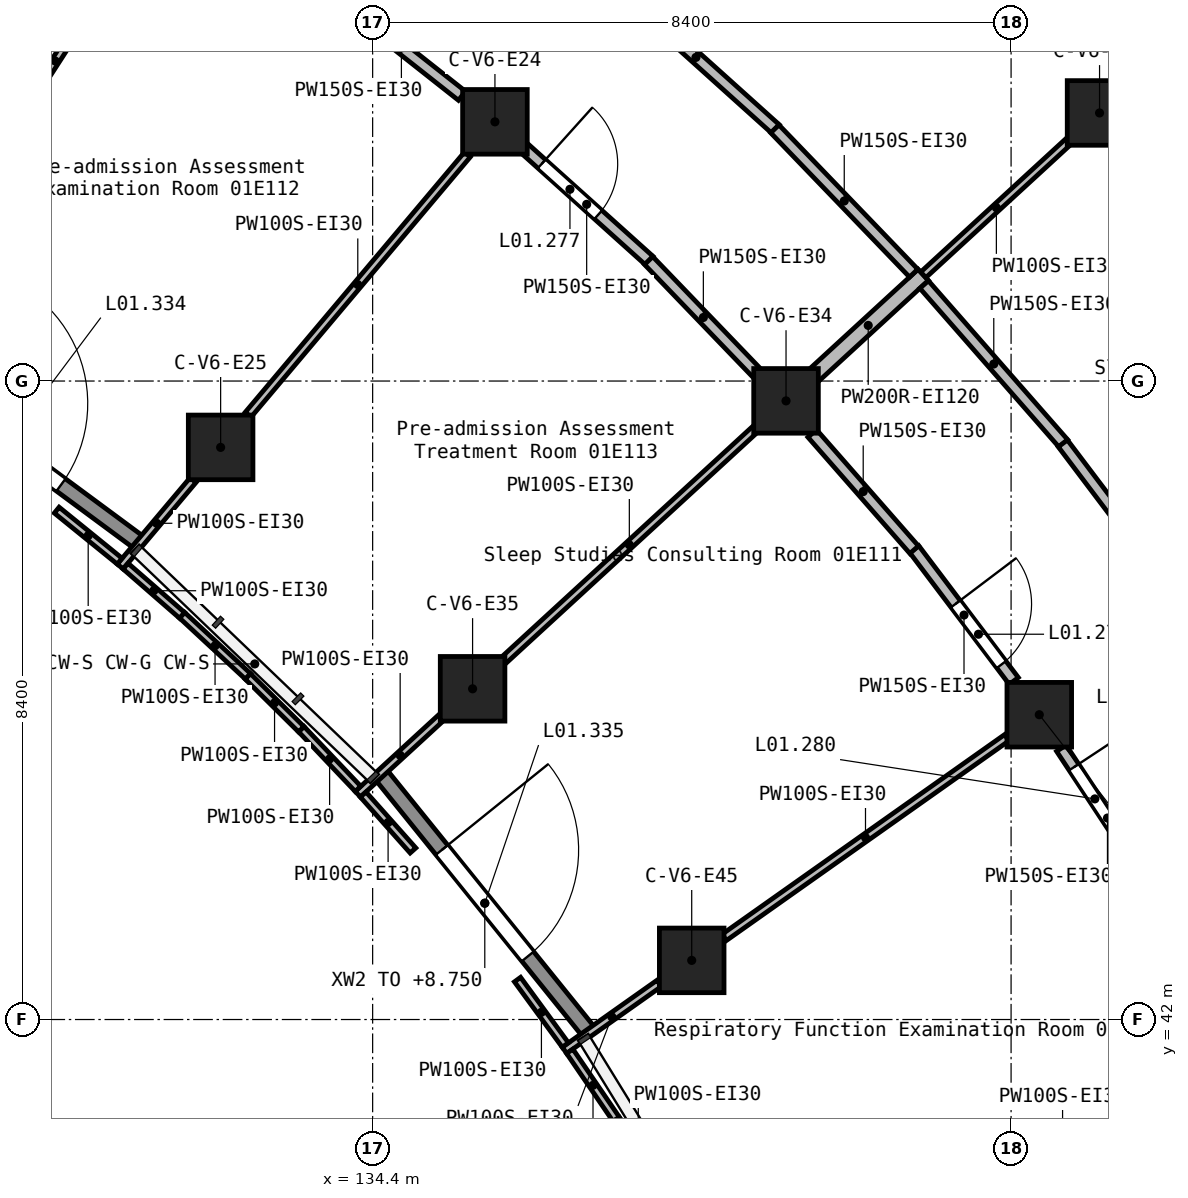
"""IFC4 building model, lengths in metres.
Left out: names, types, materials, properties, quantities, classifications, styles, units other than length and angle.
Written with IfcOpenShell. Run it as: python <this file> out.ifc"""

import sys

from ifc_helpers import new_model, si_unit, direction, frame, frame_2d, origin, origin_2d, place, context, subcontext, project, spatial, rectangle, extrude, element, fill, save


model = new_model("IFC4")
c1 = context("Model", 3, precision=1e-05, world=origin(), true_north=direction((0.0, 1.0)))
c2 = subcontext(c1, "Body", "Model", "MODEL_VIEW")
j1 = project(units=[si_unit("LENGTHUNIT", "METRE"), si_unit("PLANEANGLEUNIT", "RADIAN")], contexts=[c1])
p1 = place(None, origin())
s1 = spatial("IfcSite", under=j1, at=p1, CompositionType="ELEMENT")
p2 = place(p1, origin())
s2 = spatial("IfcBuilding", under=s1, at=p2, CompositionType="ELEMENT")
p3 = place(p2, frame((0.0, 0.0, 5.4)))
s3 = spatial("IfcBuildingStorey", under=s2, at=p3, CompositionType="ELEMENT", Elevation=5.4)
for number, where, z_axis, x_axis in (
    (1, (132.4, 49.527, 0.0), (0.0, 0.0, 1.0), (1.0, 0.0, 0.0)),
    (2, (135.715, 46.351, 0.0), (0.0, 0.0, 1.0), (1.0, 0.0, 0.0)),
    (3, (136.009, 53.81, 0.0), (0.0, 0.0, 1.0), (1.0, 0.0, 0.0)),
    (4, (138.598, 42.778, 0.0), (0.0, 0.0, 1.0), (1.0, 0.0, 0.0)),
    (5, (139.839, 50.139, 0.0), (0.0, 0.0, 1.0), (1.0, 0.0, 0.0)),
    (6, (143.171, 46.01, 0.0), (0.0, 0.0, 1.0), (1.0, 0.0, 0.0)),
    (7, (143.964, 53.927, 0.0), (0.0, 0.0, 1.0), (1.0, 0.0, 0.0)),
):
    element("IfcColumn", number, at=place(p3, frame(where, z_axis=z_axis, x_axis=x_axis)), inside=s3, PredefinedType="COLUMN", context=c2, shape_type="SweptSolid", body=[
        extrude(rectangle(XDim=0.85, YDim=0.85, at=origin_2d()), origin(), (0.0, 0.0, 1.0), 4.5),
    ])
p4 = place(p3, frame((127.819, 50.866, 0.0), z_axis=(0.0, 0.0, 1.0), x_axis=(0.804238862444, -0.594306193923, 0.0)))
e8 = element("IfcWall", 8, at=p4, inside=s3, PredefinedType="STANDARD", context=c2, shape_type="SweptSolid", body=[
    extrude(rectangle(XDim=4.368, YDim=0.2, at=frame_2d((2.184, 0.0))), origin(), (0.0, 0.0, 1.0), 3.35),
])
p5 = place(p4, frame((1.284, 0.0, 0.0)))
e9 = element("IfcOpeningElement", 9, at=p5, cuts=e8, PredefinedType="OPENING", context=c2, shape_type="SweptSolid", body=[
    extrude(rectangle(XDim=1.8, YDim=2.4, at=frame_2d((0.9, 1.2))), frame((0.0, 0.11, 0.0), z_axis=(0.0, -1.0, 0.0), x_axis=(1.0, 0.0, 0.0)), (0.0, 0.0, 1.0), 0.22),
])
p6 = place(p3, frame((134.504, 45.23, 0.0), z_axis=(0.0, 0.0, 1.0), x_axis=(0.628043022297, -0.778178618406, 0.0)))
e10 = element("IfcWall", 10, at=p6, inside=s3, PredefinedType="STANDARD", context=c2, shape_type="SweptSolid", body=[
    extrude(rectangle(XDim=4.368, YDim=0.2, at=frame_2d((2.184, 0.0))), origin(), (0.0, 0.0, 1.0), 3.35),
])
p7 = place(p6, frame((1.284, 0.0, 0.0)))
e11 = element("IfcOpeningElement", 11, at=p7, cuts=e10, PredefinedType="OPENING", context=c2, shape_type="SweptSolid", body=[
    extrude(rectangle(XDim=1.8, YDim=2.4, at=frame_2d((0.9, 1.2))), frame((0.0, 0.11, 0.0), z_axis=(0.0, -1.0, 0.0), x_axis=(1.0, 0.0, 0.0)), (0.0, 0.0, 1.0), 0.22),
])
p8 = place(p3, frame((140.196, 50.467, 0.0), z_axis=(0.0, 0.0, 1.0), x_axis=(0.736519787736, 0.676415997943, 0.0)))
e12 = element("IfcWall", 12, at=p8, inside=s3, PredefinedType="SOLIDWALL", context=c2, shape_type="SweptSolid", body=[
    extrude(rectangle(XDim=1.966, YDim=0.2, at=frame_2d((0.983, 0.0))), origin(), (0.0, 0.0, 1.0), 4.15),
])
p9 = place(p3, frame((141.656, 51.669, 0.0), z_axis=(0.0, 0.0, 1.0), x_axis=(0.659076402407, -0.752075990702, 0.0)))
e13 = element("IfcWall", 13, at=p9, inside=s3, PredefinedType="PARTITIONING", context=c2, shape_type="SweptSolid", body=[
    extrude(rectangle(XDim=2.78, YDim=0.15, at=frame_2d((1.39, 0.0))), origin(), (0.0, 0.0, 1.0), 4.15),
])
p10 = place(p3, frame((137.608, 55.598, 0.0), z_axis=(0.0, 0.0, 1.0), x_axis=(0.743501368773, -0.668734412628, 0.0)))
e14 = element("IfcWall", 14, at=p10, inside=s3, PredefinedType="PARTITIONING", context=c2, shape_type="SweptSolid", body=[
    extrude(rectangle(XDim=2.812, YDim=0.15, at=frame_2d((1.406, 0.0))), origin(), (0.0, 0.0, 1.0), 4.15),
])
p11 = place(p3, frame((143.481, 49.579, 0.0), z_axis=(0.0, 0.0, 1.0), x_axis=(0.602824021104, -0.797874175281, 0.0)))
e15 = element("IfcWall", 15, at=p11, inside=s3, PredefinedType="PARTITIONING", context=c2, shape_type="SweptSolid", body=[
    extrude(rectangle(XDim=2.666, YDim=0.15, at=frame_2d((1.333, 0.0))), origin(), (0.0, 0.0, 1.0), 4.15),
])
p12 = place(p3, frame((139.691, 53.718, 0.0), z_axis=(0.0, 0.0, 1.0), x_axis=(0.693447550136, -0.720507109757, 0.0)))
e16 = element("IfcWall", 16, at=p12, inside=s3, PredefinedType="PARTITIONING", context=c2, shape_type="SweptSolid", body=[
    extrude(rectangle(XDim=2.635, YDim=0.15, at=frame_2d((1.317, 0.0))), origin(), (0.0, 0.0, 1.0), 4.15),
])
p13 = place(p3, frame((136.393, 53.465, 0.0), z_axis=(0.0, 0.0, 1.0), x_axis=(0.743617683722, -0.668605070618, 0.0)))
e17 = element("IfcWall", 17, at=p13, inside=s3, PredefinedType="PARTITIONING", context=c2, shape_type="SweptSolid", body=[
    extrude(rectangle(XDim=2.213, YDim=0.15, at=frame_2d((1.106, 0.0))), origin(), (0.0, 0.0, 1.0), 4.15),
])
p14 = place(p13, frame((0.311, 0.0, 0.0)))
e18 = element("IfcOpeningElement", 18, at=p14, cuts=e17, PredefinedType="OPENING", context=c2, shape_type="SweptSolid", body=[
    extrude(rectangle(XDim=1.0, YDim=2.1, at=frame_2d((0.5, 1.05))), frame((0.0, 0.085, 0.0), z_axis=(0.0, -1.0, 0.0), x_axis=(1.0, 0.0, 0.0)), (0.0, 0.0, 1.0), 0.17),
])
p15 = place(p3, frame((141.526, 48.188, 0.0), z_axis=(0.0, 0.0, 1.0), x_axis=(0.60280129331, -0.797891346477, 0.0)))
e19 = element("IfcWall", 19, at=p15, inside=s3, PredefinedType="PARTITIONING", context=c2, shape_type="SweptSolid", body=[
    extrude(rectangle(XDim=2.172, YDim=0.15, at=frame_2d((1.086, 0.0))), origin(), (0.0, 0.0, 1.0), 4.15),
])
p16 = place(p15, frame((0.902, 0.0, 0.0)))
e20 = element("IfcOpeningElement", 20, at=p16, cuts=e19, PredefinedType="OPENING", context=c2, shape_type="SweptSolid", body=[
    extrude(rectangle(XDim=1.0, YDim=2.1, at=frame_2d((0.5, 1.05))), frame((0.0, 0.085, 0.0), z_axis=(0.0, -1.0, 0.0), x_axis=(1.0, 0.0, 0.0)), (0.0, 0.0, 1.0), 0.17),
])
p17 = place(p3, frame((143.462, 45.57, 0.0), z_axis=(0.0, 0.0, 1.0), x_axis=(0.550880835548, -0.834583911315, 0.0)))
e21 = element("IfcWall", 21, at=p17, inside=s3, PredefinedType="PARTITIONING", context=c2, shape_type="SweptSolid", body=[
    extrude(rectangle(XDim=2.201, YDim=0.15, at=frame_2d((1.101, 0.0))), origin(), (0.0, 0.0, 1.0), 4.15),
])
p18 = place(p17, frame((0.299, 0.0, 0.0)))
e22 = element("IfcOpeningElement", 22, at=p18, cuts=e21, PredefinedType="OPENING", context=c2, shape_type="SweptSolid", body=[
    extrude(rectangle(XDim=1.0, YDim=2.1, at=frame_2d((0.5, 1.05))), frame((0.0, 0.085, 0.0), z_axis=(0.0, -1.0, 0.0), x_axis=(1.0, 0.0, 0.0)), (0.0, 0.0, 1.0), 0.17),
])
p19 = place(p3, frame((133.981, 55.41, 0.0), z_axis=(0.0, 0.0, 1.0), x_axis=(0.784968928218, -0.619535133574, 0.0)))
e23 = element("IfcWall", 23, at=p19, inside=s3, PredefinedType="PARTITIONING", context=c2, shape_type="SweptSolid", body=[
    extrude(rectangle(XDim=2.031, YDim=0.15, at=frame_2d((1.015, 0.0))), origin(), (0.0, 0.0, 1.0), 4.15),
])
p20 = place(p3, frame((140.184, 49.71, 0.0), z_axis=(0.0, 0.0, 1.0), x_axis=(0.659209376091, -0.751959439381, 0.0)))
e24 = element("IfcWall", 24, at=p20, inside=s3, PredefinedType="PARTITIONING", context=c2, shape_type="SweptSolid", body=[
    extrude(rectangle(XDim=2.035, YDim=0.15, at=frame_2d((1.017, 0.0))), origin(), (0.0, 0.0, 1.0), 4.15),
])
p21 = place(p3, frame((138.031, 51.985, 0.0), z_axis=(0.0, 0.0, 1.0), x_axis=(0.693216793474, -0.7207291289, 0.0)))
e25 = element("IfcWall", 25, at=p21, inside=s3, PredefinedType="PARTITIONING", context=c2, shape_type="SweptSolid", body=[
    extrude(rectangle(XDim=2.076, YDim=0.15, at=frame_2d((1.038, 0.0))), origin(), (0.0, 0.0, 1.0), 4.15),
])
p22 = place(p3, frame((131.079, 47.96, 0.0), z_axis=(0.0, 0.0, 1.0), x_axis=(0.644403525256, 0.764685619479, 0.0)))
e26 = element("IfcWall", 26, at=p22, inside=s3, PredefinedType="PARTITIONING", context=c2, shape_type="SweptSolid", body=[
    extrude(rectangle(XDim=1.488, YDim=0.1, at=frame_2d((0.744, 0.0))), origin(), (0.0, 0.0, 1.0), 4.15),
])
p23 = place(p3, frame((132.762, 49.958, 0.0), z_axis=(0.0, 0.0, 1.0), x_axis=(0.644429680937, 0.76466357722, 0.0)))
e27 = element("IfcWall", 27, at=p23, inside=s3, PredefinedType="PARTITIONING", context=c2, shape_type="SweptSolid", body=[
    extrude(rectangle(XDim=4.475, YDim=0.1, at=frame_2d((2.238, 0.0))), origin(), (0.0, 0.0, 1.0), 4.15),
])
p24 = place(p3, frame((128.983, 52.683, 0.0), z_axis=(0.0, 0.0, 1.0), x_axis=(0.541806664818, 0.840503145716, 0.0)))
e28 = element("IfcWall", 28, at=p24, inside=s3, PredefinedType="PARTITIONING", context=c2, shape_type="SweptSolid", body=[
    extrude(rectangle(XDim=4.585, YDim=0.1, at=frame_2d((2.293, 0.0))), origin(), (0.0, 0.0, 1.0), 4.15),
])
p25 = place(p3, frame((141.427, 39.093, 0.0), z_axis=(0.0, 0.0, 1.0), x_axis=(0.88344099274, 0.46854243388, 0.0)))
e29 = element("IfcWall", 29, at=p25, inside=s3, PredefinedType="PARTITIONING", context=c2, shape_type="SweptSolid", body=[
    extrude(rectangle(XDim=4.642, YDim=0.1, at=frame_2d((2.321, 0.0))), origin(), (0.0, 0.0, 1.0), 4.15),
])
p26 = place(p3, frame((136.924, 41.595, 0.0), z_axis=(0.0, 0.0, 1.0), x_axis=(0.816643847366, 0.577141946629, 0.0)))
e30 = element("IfcWall", 30, at=p26, inside=s3, PredefinedType="PARTITIONING", context=c2, shape_type="SweptSolid", body=[
    extrude(rectangle(XDim=1.525, YDim=0.1, at=frame_2d((0.762, 0.0))), origin(), (0.0, 0.0, 1.0), 4.15),
])
p27 = place(p3, frame((139.026, 43.081, 0.0), z_axis=(0.0, 0.0, 1.0), x_axis=(0.816637661001, 0.577150700108, 0.0)))
e31 = element("IfcWall", 31, at=p27, inside=s3, PredefinedType="PARTITIONING", context=c2, shape_type="SweptSolid", body=[
    extrude(rectangle(XDim=4.551, YDim=0.1, at=frame_2d((2.275, 0.0))), origin(), (0.0, 0.0, 1.0), 4.15),
])
p28 = place(p3, frame((134.205, 44.964, 0.0), z_axis=(0.0, 0.0, 1.0), x_axis=(0.736497059378, 0.676440745023, 0.0)))
e32 = element("IfcWall", 32, at=p28, inside=s3, PredefinedType="PARTITIONING", context=c2, shape_type="SweptSolid", body=[
    extrude(rectangle(XDim=1.512, YDim=0.1, at=frame_2d((0.756, 0.0))), origin(), (0.0, 0.0, 1.0), 4.15),
])
p29 = place(p3, frame((136.111, 46.715, 0.0), z_axis=(0.0, 0.0, 1.0), x_axis=(0.736475017651, 0.676464742892, 0.0)))
e33 = element("IfcWall", 33, at=p29, inside=s3, PredefinedType="PARTITIONING", context=c2, shape_type="SweptSolid", body=[
    extrude(rectangle(XDim=4.524, YDim=0.1, at=frame_2d((2.262, 0.0))), origin(), (0.0, 0.0, 1.0), 4.15),
])
p30 = place(p3, frame((141.645, 51.798, 0.0), z_axis=(0.0, 0.0, 1.0), x_axis=(0.73658314114, 0.676347008709, 0.0)))
e34 = element("IfcWall", 34, at=p30, inside=s3, PredefinedType="PARTITIONING", context=c2, shape_type="SweptSolid", body=[
    extrude(rectangle(XDim=2.61, YDim=0.1, at=frame_2d((1.305, 0.0))), origin(), (0.0, 0.0, 1.0), 4.15),
])
p31 = place(p3, frame((130.243, 48.701, 0.0), z_axis=(0.0, 0.0, 1.0), x_axis=(0.776695177638, -0.629876655413, 0.0)))
e35 = element("IfcWall", 35, at=p31, inside=s3, PredefinedType="PARTITIONING", context=c2, shape_type="SweptSolid", body=[
    extrude(rectangle(XDim=1.066, YDim=0.1, at=frame_2d((0.533, 0.0))), origin(), (0.0, 0.0, 1.0), 4.15),
])
for number, where, z_axis, x_axis in (
    (36, (133.461, 45.821, 0.0), (0.0, 0.0, 1.0), (0.688, -0.725, 0.0)),
    (37, (136.994, 41.582, 0.0), (0.0, 0.0, 1.0), (0.564, -0.826, 0.0)),
):
    element("IfcWall", number, at=place(p3, frame(where, z_axis=z_axis, x_axis=x_axis)), inside=s3, PredefinedType="PARTITIONING", context=c2, shape_type="SweptSolid", body=[
        extrude(rectangle(XDim=1.084, YDim=0.1, at=frame_2d((0.542, 0.0))), origin(), (0.0, 0.0, 1.0), 4.15),
    ])
p32 = place(p3, frame((137.603, 40.687, 0.0), z_axis=(0.0, 0.0, 1.0), x_axis=(0.53747146193, -0.843281938388, 0.0)))
e38 = element("IfcWall", 38, at=p32, inside=s3, PredefinedType="PARTITIONING", context=c2, shape_type="SweptSolid", body=[
    extrude(rectangle(XDim=1.086, YDim=0.1, at=frame_2d((0.543, 0.0))), origin(), (0.0, 0.0, 1.0), 4.15),
])
p33 = place(p3, frame((136.306, 42.526, 0.0), z_axis=(0.0, 0.0, 1.0), x_axis=(0.590022332041, -0.807386925639, 0.0)))
e39 = element("IfcWall", 39, at=p33, inside=s3, PredefinedType="PARTITIONING", context=c2, shape_type="SweptSolid", body=[
    extrude(rectangle(XDim=1.066, YDim=0.1, at=frame_2d((0.533, 0.0))), origin(), (0.0, 0.0, 1.0), 4.15),
])
p34 = place(p3, frame((131.892, 47.32, 0.0), z_axis=(0.0, 0.0, 1.0), x_axis=(0.732793491626, -0.680451099367, 0.0)))
e40 = element("IfcWall", 40, at=p34, inside=s3, PredefinedType="PARTITIONING", context=c2, shape_type="SweptSolid", body=[
    extrude(rectangle(XDim=1.185, YDim=0.1, at=frame_2d((0.592, 0.0))), origin(), (0.0, 0.0, 1.0), 4.15),
])
p35 = place(p3, frame((132.758, 46.514, 0.0), z_axis=(0.0, 0.0, 1.0), x_axis=(0.710804317615, -0.703389808043, 0.0)))
e41 = element("IfcWall", 41, at=p35, inside=s3, PredefinedType="PARTITIONING", context=c2, shape_type="SweptSolid", body=[
    extrude(rectangle(XDim=0.988, YDim=0.1, at=frame_2d((0.494, 0.0))), origin(), (0.0, 0.0, 1.0), 4.15),
])
p36 = place(p3, frame((131.149, 47.965, 0.0), z_axis=(0.0, 0.0, 1.0), x_axis=(0.75424788942, -0.656589766373, 0.0)))
e42 = element("IfcWall", 42, at=p36, inside=s3, PredefinedType="PARTITIONING", context=c2, shape_type="SweptSolid", body=[
    extrude(rectangle(XDim=0.985, YDim=0.1, at=frame_2d((0.492, 0.0))), origin(), (0.0, 0.0, 1.0), 4.15),
])
p37 = place(p3, frame((134.276, 44.96, 0.0), z_axis=(0.0, 0.0, 1.0), x_axis=(0.66477897218, -0.747040104779, 0.0)))
e43 = element("IfcWall", 43, at=p37, inside=s3, PredefinedType="PARTITIONING", context=c2, shape_type="SweptSolid", body=[
    extrude(rectangle(XDim=0.985, YDim=0.1, at=frame_2d((0.493, 0.0))), origin(), (0.0, 0.0, 1.0), 4.15),
])
p38 = place(p5, origin())
e44 = element("IfcDoor", 44, at=p38, inside=s3, OperationType="SINGLE_SWING_LEFT", PredefinedType="DOOR", context=c2, shape_type="SweptSolid", body=[
    extrude(rectangle(XDim=1.8, YDim=2.4, at=frame_2d((0.9, 1.2))), frame((0.0, 0.025, 0.0), z_axis=(0.0, -1.0, 0.0), x_axis=(1.0, 0.0, 0.0)), (0.0, 0.0, 1.0), 0.05),
])
fill(e9, e44)
p39 = place(p7, origin())
e45 = element("IfcDoor", 45, at=p39, inside=s3, OperationType="SINGLE_SWING_LEFT", PredefinedType="DOOR", context=c2, shape_type="SweptSolid", body=[
    extrude(rectangle(XDim=1.8, YDim=2.4, at=frame_2d((0.9, 1.2))), frame((0.0, 0.025, 0.0), z_axis=(0.0, -1.0, 0.0), x_axis=(1.0, 0.0, 0.0)), (0.0, 0.0, 1.0), 0.05),
])
fill(e11, e45)
p40 = place(p14, frame((1.0, 0.0, 0.0), z_axis=(0.0, 0.0, 1.0), x_axis=(-1.0, 0.0, 0.0)))
e46 = element("IfcDoor", 46, at=p40, inside=s3, OperationType="SINGLE_SWING_RIGHT", PredefinedType="DOOR", context=c2, shape_type="SweptSolid", body=[
    extrude(rectangle(XDim=1.0, YDim=2.1, at=frame_2d((0.5, 1.05))), frame((0.0, 0.025, 0.0), z_axis=(0.0, -1.0, 0.0), x_axis=(1.0, 0.0, 0.0)), (0.0, 0.0, 1.0), 0.05),
])
fill(e18, e46)
p41 = place(p16, frame((1.0, 0.0, 0.0), z_axis=(0.0, 0.0, 1.0), x_axis=(-1.0, 0.0, 0.0)))
e47 = element("IfcDoor", 47, at=p41, inside=s3, OperationType="SINGLE_SWING_LEFT", PredefinedType="DOOR", context=c2, shape_type="SweptSolid", body=[
    extrude(rectangle(XDim=1.0, YDim=2.1, at=frame_2d((0.5, 1.05))), frame((0.0, 0.025, 0.0), z_axis=(0.0, -1.0, 0.0), x_axis=(1.0, 0.0, 0.0)), (0.0, 0.0, 1.0), 0.05),
])
fill(e20, e47)
p42 = place(p18, frame((1.0, 0.0, 0.0), z_axis=(0.0, 0.0, 1.0), x_axis=(-1.0, 0.0, 0.0)))
e48 = element("IfcDoor", 48, at=p42, inside=s3, OperationType="SINGLE_SWING_RIGHT", PredefinedType="DOOR", context=c2, shape_type="SweptSolid", body=[
    extrude(rectangle(XDim=1.0, YDim=2.1, at=frame_2d((0.5, 1.05))), frame((0.0, 0.025, 0.0), z_axis=(0.0, -1.0, 0.0), x_axis=(1.0, 0.0, 0.0)), (0.0, 0.0, 1.0), 0.05),
])
fill(e22, e48)
save(model, sys.argv[1])
